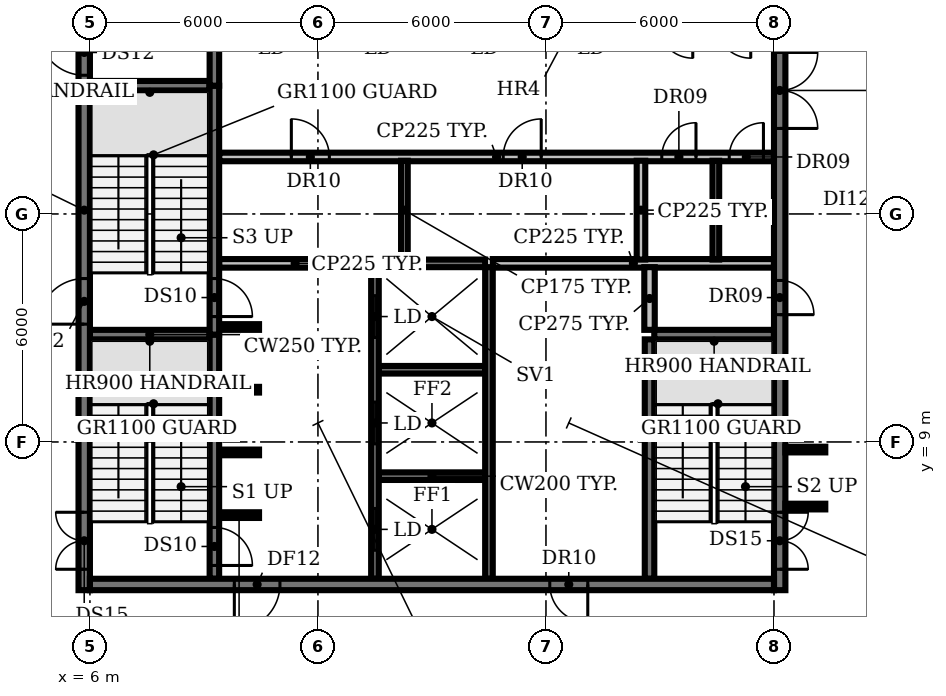
"""IFC4 building model, lengths in metres.
Left out: names, types, materials, properties, quantities, classifications, styles, units other than length and angle.
Written with IfcOpenShell. Run it as: python <this file> out.ifc"""

import sys

from ifc_helpers import new_model, si_unit, direction, frame, frame_2d, origin, place, context, subcontext, project, spatial, rectangle, extrude, element, fill, save


model = new_model("IFC4")
c1 = context("Model", 3, precision=1e-05, world=origin(), true_north=direction((0.0, 1.0)))
c2 = subcontext(c1, "Body", "Model", "MODEL_VIEW")
j1 = project(units=[si_unit("LENGTHUNIT", "METRE"), si_unit("PLANEANGLEUNIT", "RADIAN")], contexts=[c1])
p1 = place(None, origin())
s1 = spatial("IfcSite", under=j1, at=p1, CompositionType="ELEMENT")
p2 = place(p1, origin())
s2 = spatial("IfcBuilding", under=s1, at=p2, CompositionType="ELEMENT")
p3 = place(p2, frame((0.0, 0.0, 293.6)))
s3 = spatial("IfcBuildingStorey", under=s2, at=p3, CompositionType="ELEMENT", Elevation=293.6)
p4 = place(p3, frame((9.4, 7.075, 0.0), z_axis=(0.0, 0.0, 1.0), x_axis=(1.0, 0.0, 0.0)))
e1 = element("IfcWall", 1, at=p4, inside=s3, PredefinedType="SHEAR", context=c2, shape_type="SweptSolid", body=[
    extrude(rectangle(XDim=1.05, YDim=0.15, at=frame_2d((0.525, 0.0))), origin(), (0.0, 0.0, 1.0), 3.85),
])
p5 = place(p3, frame((13.6, 8.1, 0.0), z_axis=(0.0, 0.0, 1.0), x_axis=(1.0, 0.0, 0.0)))
e2 = element("IfcWall", 2, at=p5, inside=s3, PredefinedType="SHEAR", context=c2, shape_type="SweptSolid", body=[
    extrude(rectangle(XDim=2.8, YDim=0.2, at=frame_2d((1.4, 0.0))), origin(), (0.0, 0.0, 1.0), 3.85),
])
for number, where, z_axis, x_axis in (
    (3, (9.4, 8.725, 0.0), (0.0, 0.0, 1.0), (1.0, 0.0, 0.0)),
    (4, (9.4, 10.375, 0.0), (0.0, 0.0, 1.0), (1.0, 0.0, 0.0)),
):
    element("IfcWall", number, at=place(p3, frame(where, z_axis=z_axis, x_axis=x_axis)), inside=s3, PredefinedType="SHEAR", context=c2, shape_type="SweptSolid", body=[
        extrude(rectangle(XDim=1.05, YDim=0.15, at=frame_2d((0.525, 0.0))), origin(), (0.0, 0.0, 1.0), 3.85),
    ])
p6 = place(p3, frame((13.6, 10.9, 0.0), z_axis=(0.0, 0.0, 1.0), x_axis=(1.0, 0.0, 0.0)))
e5 = element("IfcWall", 5, at=p6, inside=s3, PredefinedType="SHEAR", context=c2, shape_type="SweptSolid", body=[
    extrude(rectangle(XDim=2.8, YDim=0.2, at=frame_2d((1.4, 0.0))), origin(), (0.0, 0.0, 1.0), 3.85),
])
for number, where, z_axis, x_axis in (
    (6, (6.0, 11.825, 0.0), (0.0, 0.0, 1.0), (1.0, 0.0, 0.0)),
    (7, (20.85, 11.825, 0.0), (0.0, 0.0, 1.0), (1.0, 0.0, 0.0)),
):
    element("IfcWall", number, at=place(p3, frame(where, z_axis=z_axis, x_axis=x_axis)), inside=s3, PredefinedType="SHEAR", context=c2, shape_type="SweptSolid", body=[
        extrude(rectangle(XDim=3.15, YDim=0.25, at=frame_2d((1.575, 0.0))), origin(), (0.0, 0.0, 1.0), 3.85),
    ])
p7 = place(p3, frame((9.4, 12.025, 0.0), z_axis=(0.0, 0.0, 1.0), x_axis=(1.0, 0.0, 0.0)))
e8 = element("IfcWall", 8, at=p7, inside=s3, PredefinedType="SHEAR", context=c2, shape_type="SweptSolid", body=[
    extrude(rectangle(XDim=1.05, YDim=0.15, at=frame_2d((0.525, 0.0))), origin(), (0.0, 0.0, 1.0), 3.85),
])
p8 = place(p3, frame((9.4, 13.7, 0.0), z_axis=(0.0, 0.0, 1.0), x_axis=(1.0, 0.0, 0.0)))
e9 = element("IfcWall", 9, at=p8, inside=s3, PredefinedType="PARTITIONING", context=c2, shape_type="SweptSolid", body=[
    extrude(rectangle(XDim=4.0, YDim=0.225, at=frame_2d((2.0, 0.0))), origin(), (0.0, 0.0, 1.0), 3.85),
])
p9 = place(p3, frame((13.6, 13.7, 0.0), z_axis=(0.0, 0.0, 1.0), x_axis=(1.0, 0.0, 0.0)))
e10 = element("IfcWall", 10, at=p9, inside=s3, PredefinedType="SHEAR", context=c2, shape_type="SweptSolid", body=[
    extrude(rectangle(XDim=2.8, YDim=0.2, at=frame_2d((1.4, 0.0))), origin(), (0.0, 0.0, 1.0), 3.85),
])
p10 = place(p3, frame((16.6, 13.7, 0.0), z_axis=(0.0, 0.0, 1.0), x_axis=(1.0, 0.0, 0.0)))
e11 = element("IfcWall", 11, at=p10, inside=s3, PredefinedType="PARTITIONING", context=c2, shape_type="SweptSolid", body=[
    extrude(rectangle(XDim=7.4, YDim=0.225, at=frame_2d((3.7, 0.0))), origin(), (0.0, 0.0, 1.0), 3.85),
])
p11 = place(p3, frame((9.4, 16.5, 0.0), z_axis=(0.0, 0.0, 1.0), x_axis=(1.0, 0.0, 0.0)))
e12 = element("IfcWall", 12, at=p11, inside=s3, PredefinedType="PARTITIONING", context=c2, shape_type="SweptSolid", body=[
    extrude(rectangle(XDim=14.6, YDim=0.225, at=frame_2d((7.3, 0.0))), origin(), (0.0, 0.0, 1.0), 3.85),
])
p12 = place(p11, frame((1.9, 0.0, 0.0)))
e13 = element("IfcOpeningElement", 13, at=p12, cuts=e12, PredefinedType="OPENING", context=c2, shape_type="SweptSolid", body=[
    extrude(rectangle(XDim=1.0, YDim=2.1, at=frame_2d((0.5, 1.05))), frame((0.0, 0.123, 0.0), z_axis=(0.0, -1.0, 0.0), x_axis=(1.0, 0.0, 0.0)), (0.0, 0.0, 1.0), 0.245),
])
p13 = place(p11, frame((7.475, 0.0, 0.0)))
e14 = element("IfcOpeningElement", 14, at=p13, cuts=e12, PredefinedType="OPENING", context=c2, shape_type="SweptSolid", body=[
    extrude(rectangle(XDim=1.0, YDim=2.1, at=frame_2d((0.5, 1.05))), frame((0.0, 0.123, 0.0), z_axis=(0.0, -1.0, 0.0), x_axis=(1.0, 0.0, 0.0)), (0.0, 0.0, 1.0), 0.245),
])
p14 = place(p11, frame((11.647, 0.0, 0.0)))
e15 = element("IfcOpeningElement", 15, at=p14, cuts=e12, PredefinedType="OPENING", context=c2, shape_type="SweptSolid", body=[
    extrude(rectangle(XDim=0.9, YDim=2.1, at=frame_2d((0.45, 1.05))), frame((0.0, 0.123, 0.0), z_axis=(0.0, -1.0, 0.0), x_axis=(1.0, 0.0, 0.0)), (0.0, 0.0, 1.0), 0.245),
])
p15 = place(p11, frame((13.423, 0.0, 0.0)))
e16 = element("IfcOpeningElement", 16, at=p15, cuts=e12, PredefinedType="OPENING", context=c2, shape_type="SweptSolid", body=[
    extrude(rectangle(XDim=0.9, YDim=2.1, at=frame_2d((0.45, 1.05))), frame((0.0, 0.123, 0.0), z_axis=(0.0, -1.0, 0.0), x_axis=(1.0, 0.0, 0.0)), (0.0, 0.0, 1.0), 0.245),
])
p16 = place(p3, frame((6.0, 18.375, 0.0), z_axis=(0.0, 0.0, 1.0), x_axis=(1.0, 0.0, 0.0)))
e17 = element("IfcWall", 17, at=p16, inside=s3, PredefinedType="SHEAR", context=c2, shape_type="SweptSolid", body=[
    extrude(rectangle(XDim=3.15, YDim=0.25, at=frame_2d((1.575, 0.0))), origin(), (0.0, 0.0, 1.0), 3.85),
])
p17 = place(p3, frame((9.275, 11.825, 0.0), z_axis=(0.0, 0.0, 1.0), x_axis=(0.0, -1.0, 0.0)))
e18 = element("IfcWall", 18, at=p17, inside=s3, PredefinedType="SHEAR", context=c2, shape_type="SweptSolid", body=[
    extrude(rectangle(XDim=6.425, YDim=0.25, at=frame_2d((3.212, 0.0))), origin(), (0.0, 0.0, 1.0), 3.85),
])
p18 = place(p17, frame((5.075, 0.0, 0.0)))
e19 = element("IfcOpeningElement", 19, at=p18, cuts=e18, PredefinedType="OPENING", context=c2, shape_type="SweptSolid", body=[
    extrude(rectangle(XDim=1.0, YDim=2.1, at=frame_2d((0.5, 1.05))), frame((0.0, 0.135, 0.0), z_axis=(0.0, -1.0, 0.0), x_axis=(1.0, 0.0, 0.0)), (0.0, 0.0, 1.0), 0.27),
])
p19 = place(p3, frame((9.275, 18.375, 0.0), z_axis=(0.0, 0.0, 1.0), x_axis=(0.0, -1.0, 0.0)))
e20 = element("IfcWall", 20, at=p19, inside=s3, PredefinedType="SHEAR", context=c2, shape_type="SweptSolid", body=[
    extrude(rectangle(XDim=6.55, YDim=0.25, at=frame_2d((3.275, 0.0))), origin(), (0.0, 0.0, 1.0), 3.85),
])
p20 = place(p19, frame((5.075, 0.0, 0.0)))
e21 = element("IfcOpeningElement", 21, at=p20, cuts=e20, PredefinedType="OPENING", context=c2, shape_type="SweptSolid", body=[
    extrude(rectangle(XDim=1.0, YDim=2.1, at=frame_2d((0.5, 1.05))), frame((0.0, 0.135, 0.0), z_axis=(0.0, -1.0, 0.0), x_axis=(1.0, 0.0, 0.0)), (0.0, 0.0, 1.0), 0.27),
])
p21 = place(p3, frame((9.275, 18.375, 0.0), z_axis=(0.0, 0.0, 1.0), x_axis=(0.0, 1.0, 0.0)))
e22 = element("IfcWall", 22, at=p21, inside=s3, PredefinedType="SHEAR", context=c2, shape_type="SweptSolid", body=[
    extrude(rectangle(XDim=6.425, YDim=0.25, at=frame_2d((3.212, 0.0))), origin(), (0.0, 0.0, 1.0), 3.85),
])
p22 = place(p3, frame((13.5, 5.4, 0.0), z_axis=(0.0, 0.0, 1.0), x_axis=(0.0, 1.0, 0.0)))
e23 = element("IfcWall", 23, at=p22, inside=s3, PredefinedType="SHEAR", context=c2, shape_type="SweptSolid", body=[
    extrude(rectangle(XDim=8.2, YDim=0.2, at=frame_2d((4.1, 0.0))), origin(), (0.0, 0.0, 1.0), 3.85),
])
p23 = place(p22, frame((0.75, 0.0, 0.0)))
e24 = element("IfcOpeningElement", 24, at=p23, cuts=e23, PredefinedType="OPENING", context=c2, shape_type="SweptSolid", body=[
    extrude(rectangle(XDim=1.1, YDim=2.1, at=frame_2d((0.55, 1.05))), frame((0.0, 0.11, 0.0), z_axis=(0.0, -1.0, 0.0), x_axis=(1.0, 0.0, 0.0)), (0.0, 0.0, 1.0), 0.22),
])
p24 = place(p22, frame((3.55, 0.0, 0.0)))
e25 = element("IfcOpeningElement", 25, at=p24, cuts=e23, PredefinedType="OPENING", context=c2, shape_type="SweptSolid", body=[
    extrude(rectangle(XDim=1.1, YDim=2.1, at=frame_2d((0.55, 1.05))), frame((0.0, 0.11, 0.0), z_axis=(0.0, -1.0, 0.0), x_axis=(1.0, 0.0, 0.0)), (0.0, 0.0, 1.0), 0.22),
])
p25 = place(p22, frame((6.35, 0.0, 0.0)))
e26 = element("IfcOpeningElement", 26, at=p25, cuts=e23, PredefinedType="OPENING", context=c2, shape_type="SweptSolid", body=[
    extrude(rectangle(XDim=1.1, YDim=2.1, at=frame_2d((0.55, 1.05))), frame((0.0, 0.11, 0.0), z_axis=(0.0, -1.0, 0.0), x_axis=(1.0, 0.0, 0.0)), (0.0, 0.0, 1.0), 0.22),
])
p26 = place(p3, frame((14.275, 13.8, 0.0), z_axis=(0.0, 0.0, 1.0), x_axis=(0.0, 1.0, 0.0)))
e27 = element("IfcWall", 27, at=p26, inside=s3, PredefinedType="PARTITIONING", context=c2, shape_type="SweptSolid", body=[
    extrude(rectangle(XDim=2.6, YDim=0.175, at=frame_2d((1.3, 0.0))), origin(), (0.0, 0.0, 1.0), 3.85),
])
p27 = place(p3, frame((16.5, 5.4, 0.0), z_axis=(0.0, 0.0, 1.0), x_axis=(0.0, 1.0, 0.0)))
e28 = element("IfcWall", 28, at=p27, inside=s3, PredefinedType="SHEAR", context=c2, shape_type="SweptSolid", body=[
    extrude(rectangle(XDim=8.2, YDim=0.2, at=frame_2d((4.1, 0.0))), origin(), (0.0, 0.0, 1.0), 3.85),
])
p28 = place(p3, frame((20.5, 13.8, 0.0), z_axis=(0.0, 0.0, 1.0), x_axis=(0.0, 1.0, 0.0)))
e29 = element("IfcWall", 29, at=p28, inside=s3, PredefinedType="PARTITIONING", context=c2, shape_type="SweptSolid", body=[
    extrude(rectangle(XDim=2.6, YDim=0.225, at=frame_2d((1.3, 0.0))), origin(), (0.0, 0.0, 1.0), 3.85),
])
p29 = place(p3, frame((20.725, 5.4, 0.0), z_axis=(0.0, 0.0, 1.0), x_axis=(0.0, 1.0, 0.0)))
e30 = element("IfcWall", 30, at=p29, inside=s3, PredefinedType="SHEAR", context=c2, shape_type="SweptSolid", body=[
    extrude(rectangle(XDim=6.3, YDim=0.25, at=frame_2d((3.15, 0.0))), origin(), (0.0, 0.0, 1.0), 3.85),
])
p30 = place(p3, frame((20.725, 11.95, 0.0), z_axis=(0.0, 0.0, 1.0), x_axis=(0.0, 1.0, 0.0)))
e31 = element("IfcWall", 31, at=p30, inside=s3, PredefinedType="PARTITIONING", context=c2, shape_type="SweptSolid", body=[
    extrude(rectangle(XDim=1.65, YDim=0.275, at=frame_2d((0.825, 0.0))), origin(), (0.0, 0.0, 1.0), 3.85),
])
p31 = place(p3, frame((22.47, 13.8, 0.0), z_axis=(0.0, 0.0, 1.0), x_axis=(0.0, 1.0, 0.0)))
e32 = element("IfcWall", 32, at=p31, inside=s3, PredefinedType="PARTITIONING", context=c2, shape_type="SweptSolid", body=[
    extrude(rectangle(XDim=2.6, YDim=0.175, at=frame_2d((1.3, 0.0))), origin(), (0.0, 0.0, 1.0), 3.85),
])
p32 = place(p3, frame((5.85, 5.1, 0.0), z_axis=(0.0, 0.0, 1.0), x_axis=(0.0, 1.0, 0.0)))
e33 = element("IfcWall", 33, at=p32, inside=s3, PredefinedType="SHEAR", context=c2, shape_type="SweptSolid", body=[
    extrude(rectangle(XDim=20.0, YDim=0.3, at=frame_2d((10.0, 0.0))), origin(), (0.0, 0.0, 1.0), 3.85),
])
p33 = place(p32, frame((0.55, 0.0, 0.0)))
e34 = element("IfcOpeningElement", 34, at=p33, cuts=e33, PredefinedType="OPENING", context=c2, shape_type="SweptSolid", body=[
    extrude(rectangle(XDim=1.5, YDim=2.1, at=frame_2d((0.75, 1.05))), frame((0.0, 0.16, 0.0), z_axis=(0.0, -1.0, 0.0), x_axis=(1.0, 0.0, 0.0)), (0.0, 0.0, 1.0), 0.32),
])
p34 = place(p32, frame((7.0, 0.0, 0.0)))
e35 = element("IfcOpeningElement", 35, at=p34, cuts=e33, PredefinedType="OPENING", context=c2, shape_type="SweptSolid", body=[
    extrude(rectangle(XDim=1.2, YDim=2.1, at=frame_2d((0.6, 1.05))), frame((0.0, 0.16, 0.0), z_axis=(0.0, -1.0, 0.0), x_axis=(1.0, 0.0, 0.0)), (0.0, 0.0, 1.0), 0.32),
])
p35 = place(p32, frame((13.55, 0.0, 0.0)))
e36 = element("IfcOpeningElement", 36, at=p35, cuts=e33, PredefinedType="OPENING", context=c2, shape_type="SweptSolid", body=[
    extrude(rectangle(XDim=1.2, YDim=2.1, at=frame_2d((0.6, 1.05))), frame((0.0, 0.16, 0.0), z_axis=(0.0, -1.0, 0.0), x_axis=(1.0, 0.0, 0.0)), (0.0, 0.0, 1.0), 0.32),
])
p36 = place(p3, frame((24.15, 25.655, 0.0), z_axis=(0.0, 0.0, 1.0), x_axis=(0.0, -1.0, 0.0)))
e37 = element("IfcWall", 37, at=p36, inside=s3, PredefinedType="SHEAR", context=c2, shape_type="SweptSolid", body=[
    extrude(rectangle(XDim=20.555, YDim=0.3, at=frame_2d((10.277, 0.0))), origin(), (0.0, 0.0, 1.0), 3.85),
])
p37 = place(p36, frame((18.505, 0.0, 0.0)))
e38 = element("IfcOpeningElement", 38, at=p37, cuts=e37, PredefinedType="OPENING", context=c2, shape_type="SweptSolid", body=[
    extrude(rectangle(XDim=1.5, YDim=2.1, at=frame_2d((0.75, 1.05))), frame((0.0, 0.16, 0.0), z_axis=(0.0, -1.0, 0.0), x_axis=(1.0, 0.0, 0.0)), (0.0, 0.0, 1.0), 0.32),
])
p38 = place(p36, frame((12.405, 0.0, 0.0)))
e39 = element("IfcOpeningElement", 39, at=p38, cuts=e37, PredefinedType="OPENING", context=c2, shape_type="SweptSolid", body=[
    extrude(rectangle(XDim=0.9, YDim=2.1, at=frame_2d((0.45, 1.05))), frame((0.0, 0.16, 0.0), z_axis=(0.0, -1.0, 0.0), x_axis=(1.0, 0.0, 0.0)), (0.0, 0.0, 1.0), 0.32),
])
p39 = place(p36, frame((6.405, 0.0, 0.0)))
e40 = element("IfcOpeningElement", 40, at=p39, cuts=e37, PredefinedType="OPENING", context=c2, shape_type="SweptSolid", body=[
    extrude(rectangle(XDim=2.0, YDim=2.1, at=frame_2d((1.0, 1.05))), frame((0.0, 0.16, 0.0), z_axis=(0.0, -1.0, 0.0), x_axis=(1.0, 0.0, 0.0)), (0.0, 0.0, 1.0), 0.32),
])
p40 = place(p3, frame((24.0, 5.25, 0.0), z_axis=(0.0, 0.0, 1.0), x_axis=(-1.0, 0.0, 0.0)))
e41 = element("IfcWall", 41, at=p40, inside=s3, PredefinedType="SHEAR", context=c2, shape_type="SweptSolid", body=[
    extrude(rectangle(XDim=18.0, YDim=0.3, at=frame_2d((9.0, 0.0))), origin(), (0.0, 0.0, 1.0), 3.85),
])
p41 = place(p40, frame((13.0, 0.0, 0.0)))
e42 = element("IfcOpeningElement", 42, at=p41, cuts=e41, PredefinedType="OPENING", context=c2, shape_type="SweptSolid", body=[
    extrude(rectangle(XDim=1.2, YDim=2.1, at=frame_2d((0.6, 1.05))), frame((0.0, 0.16, 0.0), z_axis=(0.0, -1.0, 0.0), x_axis=(1.0, 0.0, 0.0)), (0.0, 0.0, 1.0), 0.32),
])
p42 = place(p40, frame((4.9, 0.0, 0.0)))
e43 = element("IfcOpeningElement", 43, at=p42, cuts=e41, PredefinedType="OPENING", context=c2, shape_type="SweptSolid", body=[
    extrude(rectangle(XDim=1.0, YDim=2.1, at=frame_2d((0.5, 1.05))), frame((0.0, 0.16, 0.0), z_axis=(0.0, -1.0, 0.0), x_axis=(1.0, 0.0, 0.0)), (0.0, 0.0, 1.0), 0.32),
])
for number, where, z_axis, x_axis in (
    (44, (24.3, 7.3, 0.0), (0.0, 0.0, 1.0), (1.0, 0.0, 0.0)),
    (45, (24.3, 8.8, 0.0), (0.0, 0.0, 1.0), (1.0, 0.0, 0.0)),
):
    element("IfcWall", number, at=place(p3, frame(where, z_axis=z_axis, x_axis=x_axis)), inside=s3, PredefinedType="PARTITIONING", context=c2, shape_type="SweptSolid", body=[
        extrude(rectangle(XDim=1.05, YDim=0.15, at=frame_2d((0.525, 0.0))), origin(), (0.0, 0.0, 1.0), 2.9),
    ])
p43 = place(p12, origin())
e46 = element("IfcDoor", 46, at=p43, inside=s3, OperationType="SINGLE_SWING_LEFT", PredefinedType="DOOR", context=c2, shape_type="SweptSolid", body=[
    extrude(rectangle(XDim=1.0, YDim=2.1, at=frame_2d((0.5, 1.05))), frame((0.0, 0.025, 0.0), z_axis=(0.0, -1.0, 0.0), x_axis=(1.0, 0.0, 0.0)), (0.0, 0.0, 1.0), 0.05),
])
fill(e13, e46)
p44 = place(p13, origin())
e47 = element("IfcDoor", 47, at=p44, inside=s3, OperationType="SINGLE_SWING_RIGHT", PredefinedType="DOOR", context=c2, shape_type="SweptSolid", body=[
    extrude(rectangle(XDim=1.0, YDim=2.1, at=frame_2d((0.5, 1.05))), frame((0.0, 0.025, 0.0), z_axis=(0.0, -1.0, 0.0), x_axis=(1.0, 0.0, 0.0)), (0.0, 0.0, 1.0), 0.05),
])
fill(e14, e47)
p45 = place(p14, origin())
e48 = element("IfcDoor", 48, at=p45, inside=s3, OperationType="SINGLE_SWING_RIGHT", PredefinedType="DOOR", context=c2, shape_type="SweptSolid", body=[
    extrude(rectangle(XDim=0.9, YDim=2.1, at=frame_2d((0.45, 1.05))), frame((0.0, 0.025, 0.0), z_axis=(0.0, -1.0, 0.0), x_axis=(1.0, 0.0, 0.0)), (0.0, 0.0, 1.0), 0.05),
])
fill(e15, e48)
p46 = place(p15, origin())
e49 = element("IfcDoor", 49, at=p46, inside=s3, OperationType="SINGLE_SWING_RIGHT", PredefinedType="DOOR", context=c2, shape_type="SweptSolid", body=[
    extrude(rectangle(XDim=0.9, YDim=2.1, at=frame_2d((0.45, 1.05))), frame((0.0, 0.025, 0.0), z_axis=(0.0, -1.0, 0.0), x_axis=(1.0, 0.0, 0.0)), (0.0, 0.0, 1.0), 0.05),
])
fill(e16, e49)
p47 = place(p18, origin())
e50 = element("IfcDoor", 50, at=p47, inside=s3, OperationType="SINGLE_SWING_RIGHT", PredefinedType="DOOR", context=c2, shape_type="SweptSolid", body=[
    extrude(rectangle(XDim=1.0, YDim=2.1, at=frame_2d((0.5, 1.05))), frame((0.0, 0.025, 0.0), z_axis=(0.0, -1.0, 0.0), x_axis=(1.0, 0.0, 0.0)), (0.0, 0.0, 1.0), 0.05),
])
fill(e19, e50)
p48 = place(p20, origin())
e51 = element("IfcDoor", 51, at=p48, inside=s3, OperationType="SINGLE_SWING_RIGHT", PredefinedType="DOOR", context=c2, shape_type="SweptSolid", body=[
    extrude(rectangle(XDim=1.0, YDim=2.1, at=frame_2d((0.5, 1.05))), frame((0.0, 0.025, 0.0), z_axis=(0.0, -1.0, 0.0), x_axis=(1.0, 0.0, 0.0)), (0.0, 0.0, 1.0), 0.05),
])
fill(e21, e51)
p49 = place(p23, origin())
e52 = element("IfcDoor", 52, at=p49, inside=s3, OperationType="DOUBLE_DOOR_SLIDING", PredefinedType="DOOR", context=c2, shape_type="SweptSolid", body=[
    extrude(rectangle(XDim=1.1, YDim=2.1, at=frame_2d((0.55, 1.05))), frame((0.0, 0.025, 0.0), z_axis=(0.0, -1.0, 0.0), x_axis=(1.0, 0.0, 0.0)), (0.0, 0.0, 1.0), 0.05),
])
fill(e24, e52)
p50 = place(p24, origin())
e53 = element("IfcDoor", 53, at=p50, inside=s3, OperationType="DOUBLE_DOOR_SLIDING", PredefinedType="DOOR", context=c2, shape_type="SweptSolid", body=[
    extrude(rectangle(XDim=1.1, YDim=2.1, at=frame_2d((0.55, 1.05))), frame((0.0, 0.025, 0.0), z_axis=(0.0, -1.0, 0.0), x_axis=(1.0, 0.0, 0.0)), (0.0, 0.0, 1.0), 0.05),
])
fill(e25, e53)
p51 = place(p25, origin())
e54 = element("IfcDoor", 54, at=p51, inside=s3, OperationType="DOUBLE_DOOR_SLIDING", PredefinedType="DOOR", context=c2, shape_type="SweptSolid", body=[
    extrude(rectangle(XDim=1.1, YDim=2.1, at=frame_2d((0.55, 1.05))), frame((0.0, 0.025, 0.0), z_axis=(0.0, -1.0, 0.0), x_axis=(1.0, 0.0, 0.0)), (0.0, 0.0, 1.0), 0.05),
])
fill(e26, e54)
p52 = place(p33, origin())
e55 = element("IfcDoor", 55, at=p52, inside=s3, OperationType="DOUBLE_DOOR_SINGLE_SWING", PredefinedType="DOOR", context=c2, shape_type="SweptSolid", body=[
    extrude(rectangle(XDim=1.5, YDim=2.1, at=frame_2d((0.75, 1.05))), frame((0.0, 0.025, 0.0), z_axis=(0.0, -1.0, 0.0), x_axis=(1.0, 0.0, 0.0)), (0.0, 0.0, 1.0), 0.05),
])
fill(e34, e55)
p53 = place(p34, origin())
e56 = element("IfcDoor", 56, at=p53, inside=s3, OperationType="SINGLE_SWING_LEFT", PredefinedType="DOOR", context=c2, shape_type="SweptSolid", body=[
    extrude(rectangle(XDim=1.2, YDim=2.1, at=frame_2d((0.6, 1.05))), frame((0.0, 0.025, 0.0), z_axis=(0.0, -1.0, 0.0), x_axis=(1.0, 0.0, 0.0)), (0.0, 0.0, 1.0), 0.05),
])
fill(e35, e56)
p54 = place(p35, origin())
e57 = element("IfcDoor", 57, at=p54, inside=s3, OperationType="SINGLE_SWING_RIGHT", PredefinedType="DOOR", context=c2, shape_type="SweptSolid", body=[
    extrude(rectangle(XDim=1.2, YDim=2.1, at=frame_2d((0.6, 1.05))), frame((0.0, 0.025, 0.0), z_axis=(0.0, -1.0, 0.0), x_axis=(1.0, 0.0, 0.0)), (0.0, 0.0, 1.0), 0.05),
])
fill(e36, e57)
p55 = place(p37, origin())
e58 = element("IfcDoor", 58, at=p55, inside=s3, OperationType="DOUBLE_DOOR_SINGLE_SWING", PredefinedType="DOOR", context=c2, shape_type="SweptSolid", body=[
    extrude(rectangle(XDim=1.5, YDim=2.1, at=frame_2d((0.75, 1.05))), frame((0.0, 0.025, 0.0), z_axis=(0.0, -1.0, 0.0), x_axis=(1.0, 0.0, 0.0)), (0.0, 0.0, 1.0), 0.05),
])
fill(e38, e58)
p56 = place(p38, origin())
e59 = element("IfcDoor", 59, at=p56, inside=s3, OperationType="SINGLE_SWING_RIGHT", PredefinedType="DOOR", context=c2, shape_type="SweptSolid", body=[
    extrude(rectangle(XDim=0.9, YDim=2.1, at=frame_2d((0.45, 1.05))), frame((0.0, 0.025, 0.0), z_axis=(0.0, -1.0, 0.0), x_axis=(1.0, 0.0, 0.0)), (0.0, 0.0, 1.0), 0.05),
])
fill(e39, e59)
p57 = place(p39, origin())
e60 = element("IfcDoor", 60, at=p57, inside=s3, OperationType="DOUBLE_DOOR_SINGLE_SWING", PredefinedType="DOOR", context=c2, shape_type="SweptSolid", body=[
    extrude(rectangle(XDim=2.0, YDim=2.1, at=frame_2d((1.0, 1.05))), frame((0.0, 0.025, 0.0), z_axis=(0.0, -1.0, 0.0), x_axis=(1.0, 0.0, 0.0)), (0.0, 0.0, 1.0), 0.05),
])
fill(e40, e60)
p58 = place(p41, origin())
e61 = element("IfcDoor", 61, at=p58, inside=s3, OperationType="SINGLE_SWING_RIGHT", PredefinedType="DOOR", context=c2, shape_type="SweptSolid", body=[
    extrude(rectangle(XDim=1.2, YDim=2.1, at=frame_2d((0.6, 1.05))), frame((0.0, 0.025, 0.0), z_axis=(0.0, -1.0, 0.0), x_axis=(1.0, 0.0, 0.0)), (0.0, 0.0, 1.0), 0.05),
])
fill(e42, e61)
p59 = place(p42, origin())
e62 = element("IfcDoor", 62, at=p59, inside=s3, OperationType="SINGLE_SWING_LEFT", PredefinedType="DOOR", context=c2, shape_type="SweptSolid", body=[
    extrude(rectangle(XDim=1.0, YDim=2.1, at=frame_2d((0.5, 1.05))), frame((0.0, 0.025, 0.0), z_axis=(0.0, -1.0, 0.0), x_axis=(1.0, 0.0, 0.0)), (0.0, 0.0, 1.0), 0.05),
])
fill(e43, e62)
save(model, sys.argv[1])
